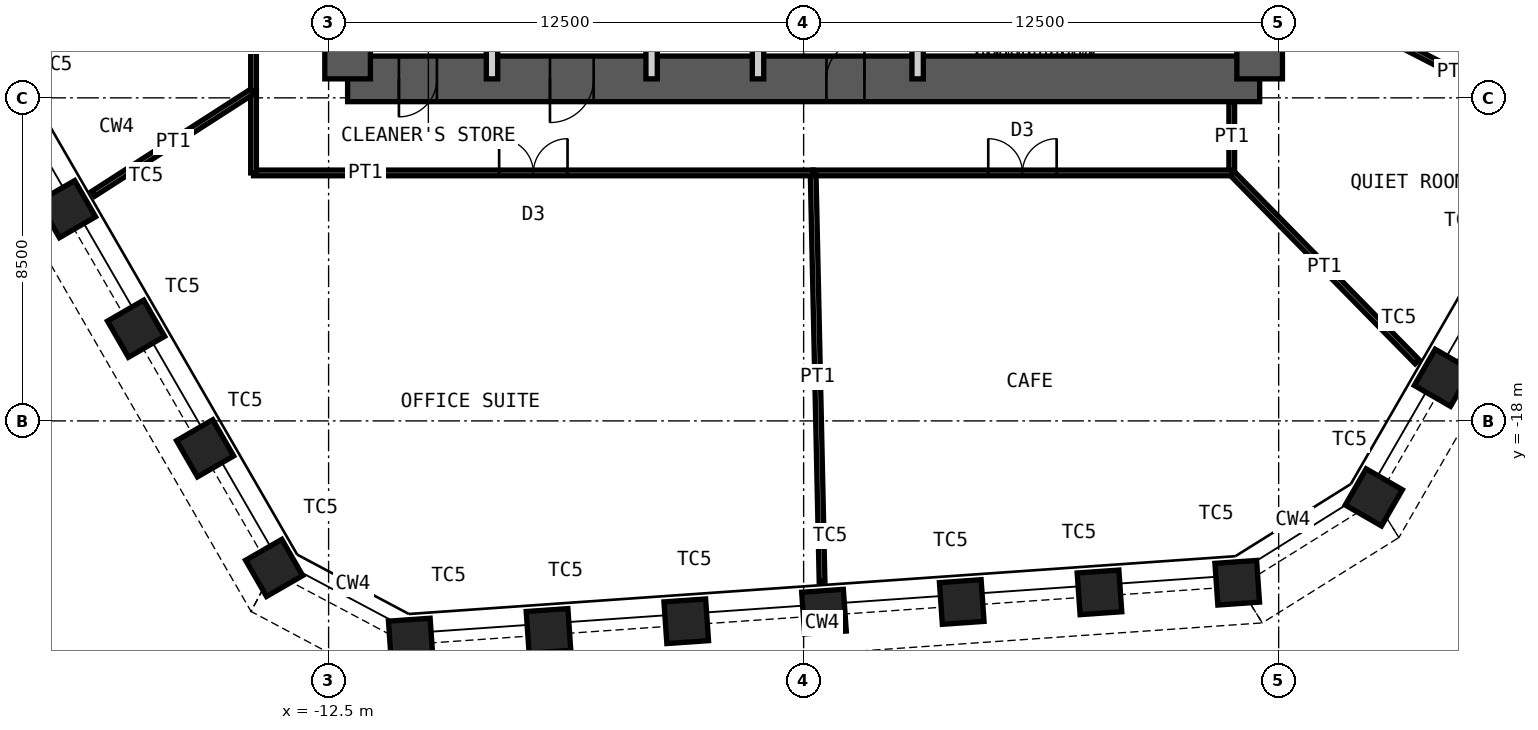
"""IFC4 building model, lengths in metres.
Left out: names, types, materials, properties, quantities, classifications, styles, units other than length and angle.
Written with IfcOpenShell. Run it as: python <this file> out.ifc"""

import sys

from ifc_helpers import new_model, si_unit, direction, frame, frame_2d, origin, origin_2d, place, context, subcontext, project, spatial, rectangle, hollow_rectangle, extrude, element, fill, save


model = new_model("IFC4")
c1 = context("Model", 3, precision=1e-05, world=origin(), true_north=direction((0.0, 1.0)))
c2 = subcontext(c1, "Body", "Model", "MODEL_VIEW")
j1 = project(units=[si_unit("LENGTHUNIT", "METRE"), si_unit("PLANEANGLEUNIT", "RADIAN")], contexts=[c1])
p1 = place(None, origin())
s1 = spatial("IfcSite", under=j1, at=p1, CompositionType="ELEMENT")
p2 = place(p1, origin())
s2 = spatial("IfcBuilding", under=s1, at=p2, CompositionType="ELEMENT")
p3 = place(p2, frame((0.0, 0.0, 218.2)))
s3 = spatial("IfcBuildingStorey", under=s2, at=p3, CompositionType="ELEMENT", Elevation=218.2)
for number, where, z_axis, x_axis in (
    (1, (16.821, -16.866, 0.0), (0.0, 0.0, 1.0), (0.5, 0.866, 0.0)),
    (2, (15.004, -20.012, 0.0), (0.0, 0.0, 1.0), (0.5, 0.866, 0.0)),
    (3, (11.41, -22.258, 0.0), (0.0, 0.0, 1.0), (0.998, 0.07, 0.0)),
    (4, (7.785, -22.512, 0.0), (0.0, 0.0, 1.0), (0.998, 0.07, 0.0)),
    (5, (4.16, -22.765, 0.0), (0.0, 0.0, 1.0), (0.998, 0.07, 0.0)),
    (6, (0.536, -23.019, 0.0), (0.0, 0.0, 1.0), (0.998, 0.07, 0.0)),
    (7, (-3.089, -23.272, 0.0), (0.0, 0.0, 1.0), (0.998, 0.07, 0.0)),
    (8, (-6.714, -23.526, 0.0), (0.0, 0.0, 1.0), (0.998, 0.07, 0.0)),
    (9, (-10.338, -23.779, 0.0), (0.0, 0.0, 1.0), (0.998, 0.07, 0.0)),
    (10, (-13.933, -21.868, 0.0), (0.0, 0.0, 1.0), (0.5, -0.866, 0.0)),
    (11, (-15.749, -18.721, 0.0), (0.0, 0.0, 1.0), (0.5, -0.866, 0.0)),
    (12, (-17.566, -15.574, 0.0), (0.0, 0.0, 1.0), (0.5, -0.866, 0.0)),
    (13, (-19.383, -12.428, 0.0), (0.0, 0.0, 1.0), (0.5, -0.866, 0.0)),
):
    element("IfcColumn", number, at=place(p3, frame(where, z_axis=z_axis, x_axis=x_axis)), inside=s3, PredefinedType="COLUMN", context=c2, shape_type="SweptSolid", body=[
        extrude(hollow_rectangle(XDim=1.1, YDim=1.1, WallThickness=0.07, at=origin_2d()), origin(), (0.0, 0.0, 1.0), 4.2),
    ])
p4 = place(p3, frame((-12.0, -9.0, 0.0), z_axis=(0.0, 0.0, 1.0), x_axis=(1.0, 0.0, 0.0)))
e14 = element("IfcWall", 14, at=p4, inside=s3, PredefinedType="SHEAR", context=c2, shape_type="SweptSolid", body=[
    extrude(rectangle(XDim=24.0, YDim=1.2, at=frame_2d((12.0, 0.0))), origin(), (0.0, 0.0, 1.0), 4.2),
])
p5 = place(p4, frame((1.35, 0.0, 0.0)))
e15 = element("IfcOpeningElement", 15, at=p5, cuts=e14, PredefinedType="OPENING", context=c2, shape_type="SweptSolid", body=[
    extrude(rectangle(XDim=1.0, YDim=2.1, at=frame_2d((0.5, 1.05))), frame((0.0, 0.61, 0.0), z_axis=(0.0, -1.0, 0.0), x_axis=(1.0, 0.0, 0.0)), (0.0, 0.0, 1.0), 1.22),
])
p6 = place(p4, frame((5.325, 0.0, 0.0)))
e16 = element("IfcOpeningElement", 16, at=p6, cuts=e14, PredefinedType="OPENING", context=c2, shape_type="SweptSolid", body=[
    extrude(rectangle(XDim=1.15, YDim=2.1, at=frame_2d((0.575, 1.05))), frame((0.0, 0.61, 0.0), z_axis=(0.0, -1.0, 0.0), x_axis=(1.0, 0.0, 0.0)), (0.0, 0.0, 1.0), 1.22),
])
p7 = place(p4, frame((12.6, 0.0, 0.0)))
e17 = element("IfcOpeningElement", 17, at=p7, cuts=e14, PredefinedType="OPENING", context=c2, shape_type="SweptSolid", body=[
    extrude(rectangle(XDim=1.0, YDim=2.1, at=frame_2d((0.5, 1.05))), frame((0.0, 0.61, 0.0), z_axis=(0.0, -1.0, 0.0), x_axis=(1.0, 0.0, 0.0)), (0.0, 0.0, 1.0), 1.22),
])
p8 = place(p3, frame((12.0, -9.0, 0.0), z_axis=(0.0, 0.0, 1.0), x_axis=(0.0, 1.0, 0.0)))
e18 = element("IfcWall", 18, at=p8, inside=s3, PredefinedType="SHEAR", context=c2, shape_type="SweptSolid", body=[
    extrude(rectangle(XDim=18.0, YDim=1.2, at=frame_2d((9.0, 0.0))), origin(), (0.0, 0.0, 1.0), 4.2),
])
p9 = place(p8, frame((8.1, 0.0, 0.0)))
e19 = element("IfcOpeningElement", 19, at=p9, cuts=e18, PredefinedType="OPENING", context=c2, shape_type="SweptSolid", body=[
    extrude(rectangle(XDim=1.8, YDim=2.1, at=frame_2d((0.9, 1.05))), frame((0.0, 0.61, 0.0), z_axis=(0.0, -1.0, 0.0), x_axis=(1.0, 0.0, 0.0)), (0.0, 0.0, 1.0), 1.22),
])
p10 = place(p3, frame((-12.0, -9.0, 0.0), z_axis=(0.0, 0.0, 1.0), x_axis=(0.0, 1.0, 0.0)))
e20 = element("IfcWall", 20, at=p10, inside=s3, PredefinedType="SHEAR", context=c2, shape_type="SweptSolid", body=[
    extrude(rectangle(XDim=18.0, YDim=1.2, at=frame_2d((9.0, 0.0))), origin(), (0.0, 0.0, 1.0), 4.2),
])
p11 = place(p10, frame((8.1, 0.0, 0.0)))
e21 = element("IfcOpeningElement", 21, at=p11, cuts=e20, PredefinedType="OPENING", context=c2, shape_type="SweptSolid", body=[
    extrude(rectangle(XDim=1.8, YDim=2.1, at=frame_2d((0.9, 1.05))), frame((0.0, 0.61, 0.0), z_axis=(0.0, -1.0, 0.0), x_axis=(1.0, 0.0, 0.0)), (0.0, 0.0, 1.0), 1.22),
])
for number, where, z_axis, x_axis in (
    (22, (-8.2, -9.0, 0.0), (0.0, 0.0, 1.0), (0.0, 1.0, 0.0)),
    (23, (-4.0, -9.0, 0.0), (0.0, 0.0, 1.0), (0.0, 1.0, 0.0)),
):
    element("IfcWall", number, at=place(p3, frame(where, z_axis=z_axis, x_axis=x_axis)), inside=s3, PredefinedType="PARTITIONING", context=c2, shape_type="SweptSolid", body=[
        extrude(rectangle(XDim=3.85, YDim=0.3, at=frame_2d((1.925, 0.0))), origin(), (0.0, 0.0, 1.0), 3.98),
    ])
p12 = place(p3, frame((-1.2, -9.0, 0.0), z_axis=(0.0, 0.0, 1.0), x_axis=(0.0, 1.0, 0.0)))
e24 = element("IfcWall", 24, at=p12, inside=s3, PredefinedType="PARTITIONING", context=c2, shape_type="SweptSolid", body=[
    extrude(rectangle(XDim=3.85, YDim=0.3, at=frame_2d((1.925, 0.0))), origin(), (0.0, 0.0, 1.0), 3.98),
])
p13 = place(p12, frame((1.375, 0.0, 0.0)))
e25 = element("IfcOpeningElement", 25, at=p13, cuts=e24, PredefinedType="OPENING", context=c2, shape_type="SweptSolid", body=[
    extrude(rectangle(XDim=1.1, YDim=2.4, at=frame_2d((0.55, 1.2))), frame((0.0, 0.16, 0.0), z_axis=(0.0, -1.0, 0.0), x_axis=(1.0, 0.0, 0.0)), (0.0, 0.0, 1.0), 0.32),
])
p14 = place(p3, frame((3.0, -9.0, 0.0), z_axis=(0.0, 0.0, 1.0), x_axis=(0.0, 1.0, 0.0)))
e26 = element("IfcWall", 26, at=p14, inside=s3, PredefinedType="PARTITIONING", context=c2, shape_type="SweptSolid", body=[
    extrude(rectangle(XDim=3.85, YDim=0.3, at=frame_2d((1.925, 0.0))), origin(), (0.0, 0.0, 1.0), 3.98),
])
p15 = place(p14, frame((1.425, 0.0, 0.0)))
e27 = element("IfcOpeningElement", 27, at=p15, cuts=e26, PredefinedType="OPENING", context=c2, shape_type="SweptSolid", body=[
    extrude(rectangle(XDim=1.0, YDim=2.1, at=frame_2d((0.5, 1.05))), frame((0.0, 0.16, 0.0), z_axis=(0.0, -1.0, 0.0), x_axis=(1.0, 0.0, 0.0)), (0.0, 0.0, 1.0), 0.32),
])
p16 = place(p3, frame((19.759, -10.177, 0.0), z_axis=(0.0, 0.0, 1.0), x_axis=(-0.889015092721, 0.457877893017, 0.0)))
e28 = element("IfcWall", 28, at=p16, inside=s3, PredefinedType="PARTITIONING", context=c2, shape_type="SweptSolid", body=[
    extrude(rectangle(XDim=5.944, YDim=0.15, at=frame_2d((2.972, 0.0))), origin(), (0.0, 0.0, 1.0), 3.43),
])
p17 = place(p3, frame((11.266, -9.6, 0.0), z_axis=(0.0, 0.0, 1.0), x_axis=(0.0, -1.0, 0.0)))
e29 = element("IfcWall", 29, at=p17, inside=s3, PredefinedType="PARTITIONING", context=c2, shape_type="SweptSolid", body=[
    extrude(rectangle(XDim=1.875, YDim=0.15, at=frame_2d((0.938, 0.0))), origin(), (0.0, 0.0, 1.0), 4.03),
])
p18 = place(p3, frame((16.145, -16.444, 0.0), z_axis=(0.0, 0.0, 1.0), x_axis=(-0.700591378209, 0.71356269576, 0.0)))
e30 = element("IfcWall", 30, at=p18, inside=s3, PredefinedType="PARTITIONING", context=c2, shape_type="SweptSolid", body=[
    extrude(rectangle(XDim=6.964, YDim=0.15, at=frame_2d((3.482, 0.0))), origin(), (0.0, 0.0, 1.0), 3.43),
])
p19 = place(p3, frame((11.266, -11.475, 0.0), z_axis=(0.0, 0.0, 1.0), x_axis=(-1.0, 0.0, 0.0)))
e31 = element("IfcWall", 31, at=p19, inside=s3, PredefinedType="PARTITIONING", context=c2, shape_type="SweptSolid", body=[
    extrude(rectangle(XDim=11.015, YDim=0.15, at=frame_2d((5.508, 0.0))), origin(), (0.0, 0.0, 1.0), 4.03),
])
p20 = place(p19, frame((4.608, 0.0, 0.0)))
e32 = element("IfcOpeningElement", 32, at=p20, cuts=e31, PredefinedType="OPENING", context=c2, shape_type="SweptSolid", body=[
    extrude(rectangle(XDim=1.8, YDim=2.4, at=frame_2d((0.9, 1.2))), frame((0.0, 0.085, 0.0), z_axis=(0.0, -1.0, 0.0), x_axis=(1.0, 0.0, 0.0)), (0.0, 0.0, 1.0), 0.17),
])
p21 = place(p3, frame((0.485, -22.22, 0.0), z_axis=(0.0, 0.0, 1.0), x_axis=(-0.021806550804, 0.999762208899, 0.0)))
e33 = element("IfcWall", 33, at=p21, inside=s3, PredefinedType="PARTITIONING", context=c2, shape_type="SweptSolid", body=[
    extrude(rectangle(XDim=10.748, YDim=0.15, at=frame_2d((5.374, 0.0))), origin(), (0.0, 0.0, 1.0), 3.43),
])
p22 = place(p3, frame((0.25, -11.475, 0.0), z_axis=(0.0, 0.0, 1.0), x_axis=(-1.0, 0.0, 0.0)))
e34 = element("IfcWall", 34, at=p22, inside=s3, PredefinedType="PARTITIONING", context=c2, shape_type="SweptSolid", body=[
    extrude(rectangle(XDim=14.725, YDim=0.15, at=frame_2d((7.363, 0.0))), origin(), (0.0, 0.0, 1.0), 4.03),
])
p23 = place(p22, frame((6.463, 0.0, 0.0)))
e35 = element("IfcOpeningElement", 35, at=p23, cuts=e34, PredefinedType="OPENING", context=c2, shape_type="SweptSolid", body=[
    extrude(rectangle(XDim=1.8, YDim=2.4, at=frame_2d((0.9, 1.2))), frame((0.0, 0.085, 0.0), z_axis=(0.0, -1.0, 0.0), x_axis=(1.0, 0.0, 0.0)), (0.0, 0.0, 1.0), 0.17),
])
p24 = place(p3, frame((-14.475, -11.475, 0.0), z_axis=(0.0, 0.0, 1.0), x_axis=(0.0, 1.0, 0.0)))
e36 = element("IfcWall", 36, at=p24, inside=s3, PredefinedType="PARTITIONING", context=c2, shape_type="SweptSolid", body=[
    extrude(rectangle(XDim=2.164, YDim=0.15, at=frame_2d((1.082, 0.0))), origin(), (0.0, 0.0, 1.0), 4.03),
])
p25 = place(p3, frame((-18.693, -12.024, 0.0), z_axis=(0.0, 0.0, 1.0), x_axis=(0.841031335058, 0.540986407824, 0.0)))
e37 = element("IfcWall", 37, at=p25, inside=s3, PredefinedType="PARTITIONING", context=c2, shape_type="SweptSolid", body=[
    extrude(rectangle(XDim=5.015, YDim=0.15, at=frame_2d((2.507, 0.0))), origin(), (0.0, 0.0, 1.0), 3.43),
])
p26 = place(p3, frame((-14.475, -9.311, 0.0), z_axis=(0.0, 0.0, 1.0), x_axis=(0.0, 1.0, 0.0)))
e38 = element("IfcWall", 38, at=p26, inside=s3, PredefinedType="PARTITIONING", context=c2, shape_type="SweptSolid", body=[
    extrude(rectangle(XDim=5.575, YDim=0.15, at=frame_2d((2.787, 0.0))), origin(), (0.0, 0.0, 1.0), 4.03),
])
p27 = place(p26, frame((2.287, 0.0, 0.0)))
e39 = element("IfcOpeningElement", 39, at=p27, cuts=e38, PredefinedType="OPENING", context=c2, shape_type="SweptSolid", body=[
    extrude(rectangle(XDim=1.0, YDim=2.4, at=frame_2d((0.5, 1.2))), frame((0.0, 0.085, 0.0), z_axis=(0.0, -1.0, 0.0), x_axis=(1.0, 0.0, 0.0)), (0.0, 0.0, 1.0), 0.17),
])
p28 = place(p5, origin())
e40 = element("IfcDoor", 40, at=p28, inside=s3, OperationType="SINGLE_SWING_LEFT", PredefinedType="DOOR", context=c2, shape_type="SweptSolid", body=[
    extrude(rectangle(XDim=1.0, YDim=2.1, at=frame_2d((0.5, 1.05))), frame((0.0, 0.025, 0.0), z_axis=(0.0, -1.0, 0.0), x_axis=(1.0, 0.0, 0.0)), (0.0, 0.0, 1.0), 0.05),
])
fill(e15, e40)
p29 = place(p6, origin())
e41 = element("IfcDoor", 41, at=p29, inside=s3, OperationType="SINGLE_SWING_LEFT", PredefinedType="DOOR", context=c2, shape_type="SweptSolid", body=[
    extrude(rectangle(XDim=1.15, YDim=2.1, at=frame_2d((0.575, 1.05))), frame((0.0, 0.025, 0.0), z_axis=(0.0, -1.0, 0.0), x_axis=(1.0, 0.0, 0.0)), (0.0, 0.0, 1.0), 0.05),
])
fill(e16, e41)
p30 = place(p7, origin())
e42 = element("IfcDoor", 42, at=p30, inside=s3, OperationType="SINGLE_SWING_LEFT", PredefinedType="DOOR", context=c2, shape_type="SweptSolid", body=[
    extrude(rectangle(XDim=1.0, YDim=2.1, at=frame_2d((0.5, 1.05))), frame((0.0, 0.025, 0.0), z_axis=(0.0, -1.0, 0.0), x_axis=(1.0, 0.0, 0.0)), (0.0, 0.0, 1.0), 0.05),
])
fill(e17, e42)
p31 = place(p20, origin())
e43 = element("IfcDoor", 43, at=p31, inside=s3, OperationType="DOUBLE_DOOR_DOUBLE_SWING", PredefinedType="DOOR", context=c2, shape_type="SweptSolid", body=[
    extrude(rectangle(XDim=1.8, YDim=2.4, at=frame_2d((0.9, 1.2))), frame((0.0, 0.025, 0.0), z_axis=(0.0, -1.0, 0.0), x_axis=(1.0, 0.0, 0.0)), (0.0, 0.0, 1.0), 0.05),
])
fill(e32, e43)
p32 = place(p23, origin())
e44 = element("IfcDoor", 44, at=p32, inside=s3, OperationType="DOUBLE_DOOR_DOUBLE_SWING", PredefinedType="DOOR", context=c2, shape_type="SweptSolid", body=[
    extrude(rectangle(XDim=1.8, YDim=2.4, at=frame_2d((0.9, 1.2))), frame((0.0, 0.025, 0.0), z_axis=(0.0, -1.0, 0.0), x_axis=(1.0, 0.0, 0.0)), (0.0, 0.0, 1.0), 0.05),
])
fill(e35, e44)
save(model, sys.argv[1])
